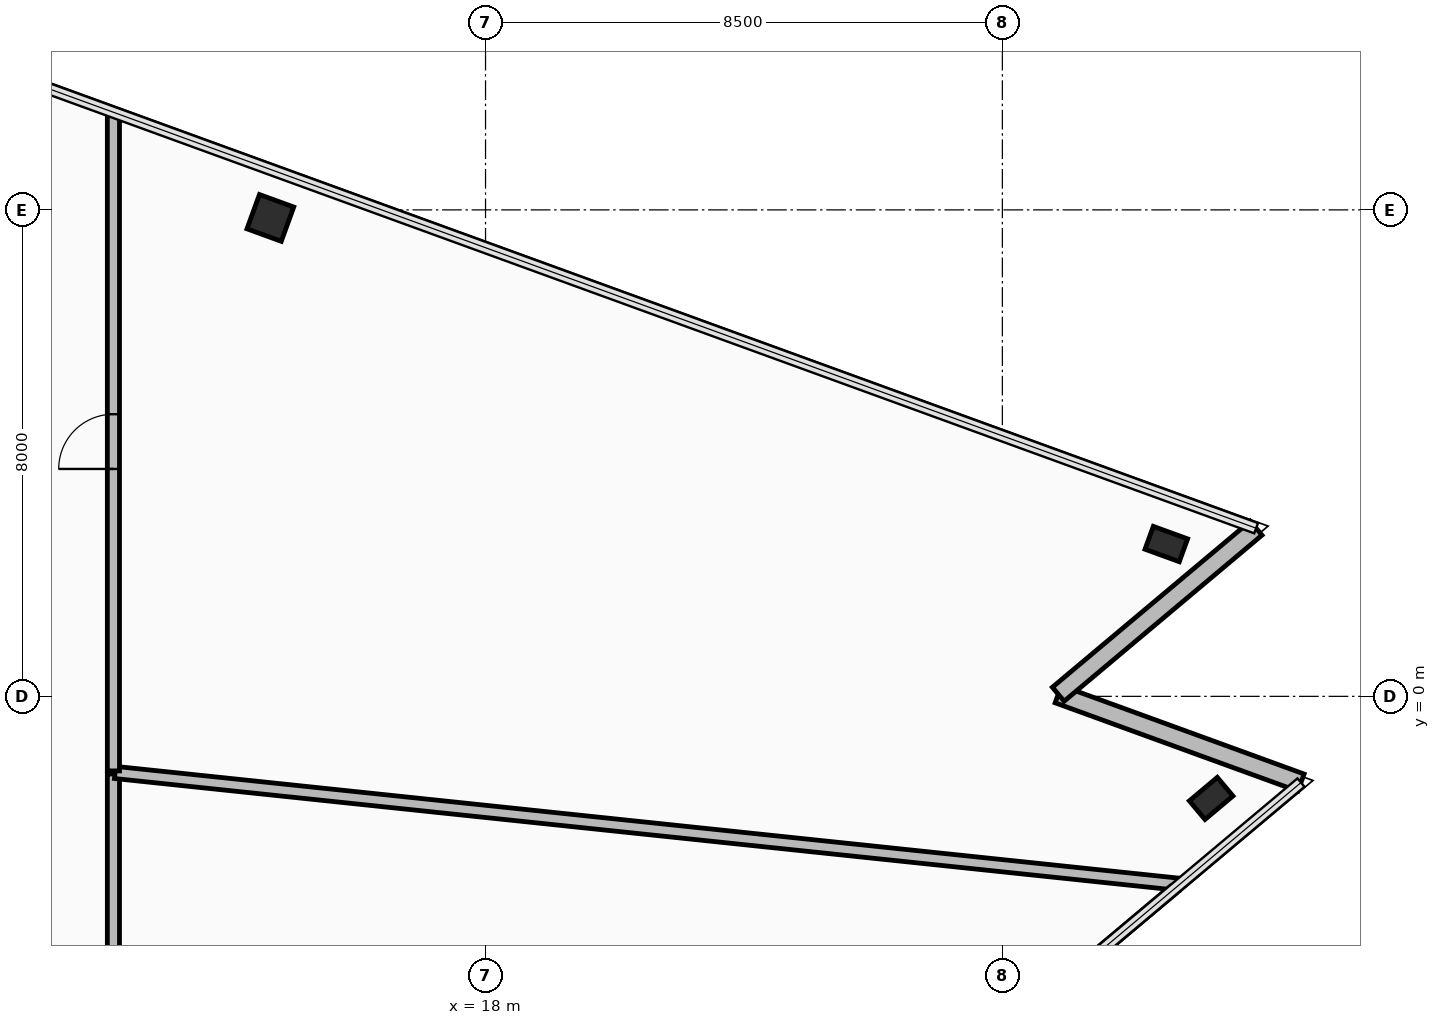
"""IFC4 building model, lengths in metres.
Left out: names, types, materials, properties, quantities, classifications, styles, units other than length and angle.
Written with IfcOpenShell. Run it as: python <this file> out.ifc"""

import sys

from ifc_helpers import new_model, si_unit, direction, frame, frame_2d, origin, origin_2d, place, context, subcontext, project, spatial, rectangle, hollow_rectangle, extrude, element, fill, save


model = new_model("IFC4")
c1 = context("Model", 3, precision=1e-05, world=origin(), true_north=direction((0.0, 1.0)))
c2 = subcontext(c1, "Body", "Model", "MODEL_VIEW")
j1 = project(units=[si_unit("LENGTHUNIT", "METRE"), si_unit("PLANEANGLEUNIT", "RADIAN")], contexts=[c1])
p1 = place(None, origin())
s1 = spatial("IfcSite", under=j1, at=p1, CompositionType="ELEMENT")
p2 = place(p1, origin())
s2 = spatial("IfcBuilding", under=s1, at=p2, CompositionType="ELEMENT")
p3 = place(p2, frame((0.0, 0.0, 184.9)))
s3 = spatial("IfcBuildingStorey", under=s2, at=p3, CompositionType="ELEMENT", Elevation=184.9)
for number, where, z_axis, x_axis in (
    (1, (29.934, -1.679, 0.0), (0.0, 0.0, 1.0), (0.766, 0.643, 0.0)),
    (2, (29.196, 2.505, 0.0), (0.0, 0.0, 1.0), (-0.94, 0.342, 0.0)),
):
    element("IfcColumn", number, at=place(p3, frame(where, z_axis=z_axis, x_axis=x_axis)), inside=s3, PredefinedType="COLUMN", context=c2, shape_type="SweptSolid", body=[
        extrude(hollow_rectangle(XDim=0.4, YDim=0.6, WallThickness=0.03, at=origin_2d()), origin(), (0.0, 0.0, 1.0), 3.6),
    ])
p4 = place(p3, frame((14.461, 7.868, 0.0), z_axis=(0.0, 0.0, 1.0), x_axis=(-0.939692023847, 0.342021783398, 0.0)))
e3 = element("IfcColumn", 3, at=p4, inside=s3, PredefinedType="COLUMN", context=c2, shape_type="SweptSolid", body=[
    extrude(hollow_rectangle(XDim=0.6, YDim=0.6, WallThickness=0.036, at=origin_2d()), origin(), (0.0, 0.0, 1.0), 3.6),
])
for number, where, z_axis, x_axis in (
    (4, (31.411, -1.418, 0.0), (0.0, 0.0, 1.0), (-0.94, 0.342, 0.0)),
    (5, (27.419, 0.035, 0.0), (0.0, 0.0, 1.0), (0.766, 0.643, 0.0)),
):
    element("IfcWall", number, at=place(p3, frame(where, z_axis=z_axis, x_axis=x_axis)), inside=s3, PredefinedType="STANDARD", context=c2, shape_type="SweptSolid", body=[
        extrude(rectangle(XDim=4.248, YDim=0.3, at=frame_2d((2.124, 0.0))), origin(), (0.0, 0.0, 1.0), 2.715),
    ])
p5 = place(p3, frame((11.88, -10.579, 0.0), z_axis=(0.0, 0.0, 1.0), x_axis=(0.0, 1.0, 0.0)))
e6 = element("IfcWall", 6, at=p5, inside=s3, PredefinedType="PARTITIONING", context=c2, shape_type="SweptSolid", body=[
    extrude(rectangle(XDim=9.303, YDim=0.2, at=frame_2d((4.651, 0.0))), origin(), (0.0, 0.0, 1.0), 2.865),
])
p6 = place(p3, frame((11.908, -1.251, 0.0), z_axis=(0.0, 0.0, 1.0), x_axis=(0.994521398487, -0.104533190666, 0.0)))
e7 = element("IfcWall", 7, at=p6, inside=s3, PredefinedType="PARTITIONING", context=c2, shape_type="SweptSolid", body=[
    extrude(rectangle(XDim=17.605, YDim=0.2, at=frame_2d((8.803, 0.0))), origin(), (0.0, 0.0, 1.0), 2.715),
])
p7 = place(p3, frame((29.304, -3.186, 0.0), z_axis=(0.0, 0.0, 1.0), x_axis=(-0.766042132119, -0.642790363819, 0.0)))
e8 = element("IfcWall", 8, at=p7, inside=s3, PredefinedType="PARTITIONING", context=c2, shape_type="SweptSolid", body=[
    extrude(rectangle(XDim=42.283, YDim=0.15, at=frame_2d((21.141, 0.0))), origin(), (0.0, 0.0, 1.0), 3.42),
])
p8 = place(p3, frame((11.88, -1.226, 0.0), z_axis=(0.0, 0.0, 1.0), x_axis=(0.0, 1.0, 0.0)))
e9 = element("IfcWall", 9, at=p8, inside=s3, PredefinedType="PARTITIONING", context=c2, shape_type="SweptSolid", body=[
    extrude(rectangle(XDim=10.832, YDim=0.2, at=frame_2d((5.416, 0.0))), origin(), (0.0, 0.0, 1.0), 2.715),
])
p9 = place(p8, frame((4.966, 0.0, 0.0)))
e10 = element("IfcOpeningElement", 10, at=p9, cuts=e9, PredefinedType="OPENING", context=c2, shape_type="SweptSolid", body=[
    extrude(rectangle(XDim=0.9, YDim=2.1, at=frame_2d((0.45, 1.05))), frame((0.0, 0.11, 0.0), z_axis=(0.0, -1.0, 0.0), x_axis=(1.0, 0.0, 0.0)), (0.0, 0.0, 1.0), 0.22),
])
p10 = place(p9, origin())
e11 = element("IfcDoor", 11, at=p10, inside=s3, OperationType="SINGLE_SWING_LEFT", PredefinedType="DOOR", context=c2, shape_type="SweptSolid", body=[
    extrude(rectangle(XDim=0.9, YDim=2.1, at=frame_2d((0.45, 1.05))), frame((0.0, 0.025, 0.0), z_axis=(0.0, -1.0, 0.0), x_axis=(1.0, 0.0, 0.0)), (0.0, 0.0, 1.0), 0.05),
])
fill(e10, e11)
save(model, sys.argv[1])
